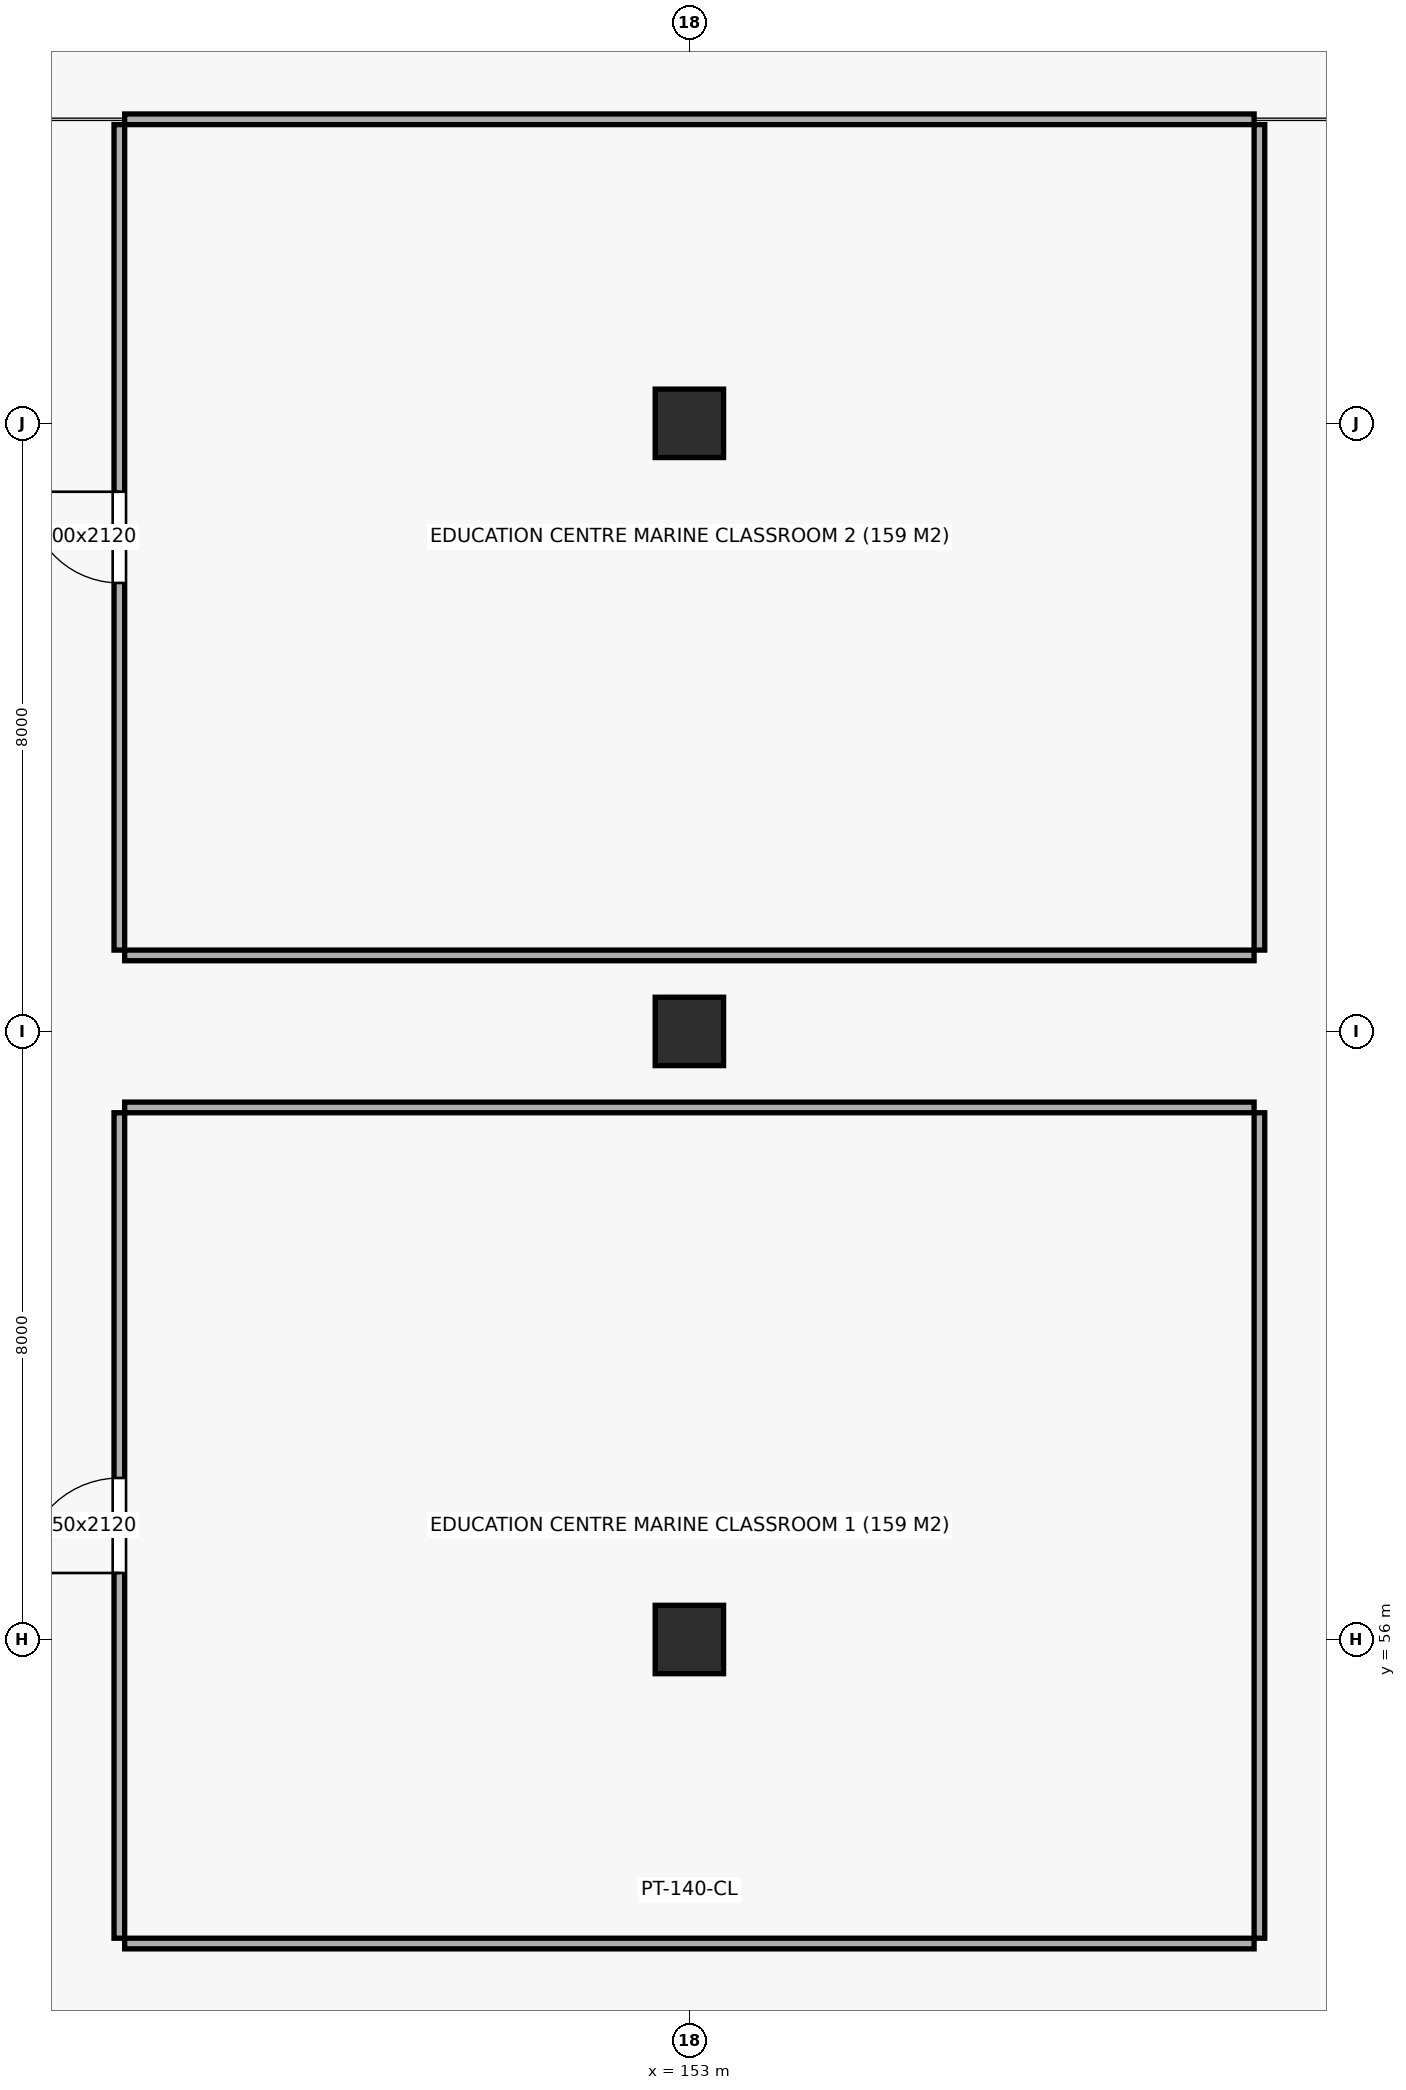
"""IFC4 building model, lengths in metres.
Left out: names, types, materials, properties, quantities, classifications, styles, units other than length and angle.
Written with IfcOpenShell. Run it as: python <this file> out.ifc"""

import sys

from ifc_helpers import new_model, si_unit, direction, frame, frame_2d, origin, origin_2d, place, context, subcontext, project, spatial, rectangle, extrude, element, fill, save


model = new_model("IFC4")
c1 = context("Model", 3, precision=1e-05, world=origin(), true_north=direction((0.0, 1.0)))
c2 = subcontext(c1, "Body", "Model", "MODEL_VIEW")
j1 = project(units=[si_unit("LENGTHUNIT", "METRE"), si_unit("PLANEANGLEUNIT", "RADIAN")], contexts=[c1])
p1 = place(None, origin())
s1 = spatial("IfcSite", under=j1, at=p1, CompositionType="ELEMENT")
p2 = place(p1, origin())
s2 = spatial("IfcBuilding", under=s1, at=p2, CompositionType="ELEMENT")
p3 = place(p2, origin())
s3 = spatial("IfcBuildingStorey", under=s2, at=p3, CompositionType="ELEMENT", Elevation=0.0)
for number, where, z_axis, x_axis in (
    (1, (153.0, 56.0, 0.0), (0.0, 0.0, 1.0), (1.0, 0.0, 0.0)),
    (2, (153.0, 64.0, 0.0), (0.0, 0.0, 1.0), (1.0, 0.0, 0.0)),
    (3, (153.0, 72.0, 0.0), (0.0, 0.0, 1.0), (1.0, 0.0, 0.0)),
):
    element("IfcColumn", number, at=place(p3, frame(where, z_axis=z_axis, x_axis=x_axis)), inside=s3, PredefinedType="COLUMN", context=c2, shape_type="SweptSolid", body=[
        extrude(rectangle(XDim=0.9, YDim=0.9, at=origin_2d()), origin(), (0.0, 0.0, 1.0), 4.5),
    ])
p4 = place(p3, frame((145.57, 52.0, 0.0), z_axis=(0.0, 0.0, 1.0), x_axis=(1.0, 0.0, 0.0)))
e4 = element("IfcWall", 4, at=p4, inside=s3, PredefinedType="PARTITIONING", context=c2, shape_type="SweptSolid", body=[
    extrude(rectangle(XDim=14.86, YDim=0.14, at=frame_2d((7.43, 0.0))), origin(), (0.0, 0.0, 1.0), 2.85),
])
p5 = place(p3, frame((145.57, 63.0, 0.0), z_axis=(0.0, 0.0, 1.0), x_axis=(1.0, 0.0, 0.0)))
e5 = element("IfcWall", 5, at=p5, inside=s3, PredefinedType="PARTITIONING", context=c2, shape_type="SweptSolid", body=[
    extrude(rectangle(XDim=14.86, YDim=0.14, at=frame_2d((7.43, 0.0))), origin(), (0.0, 0.0, 1.0), 3.3),
])
p6 = place(p3, frame((145.5, 52.07, 0.0), z_axis=(0.0, 0.0, 1.0), x_axis=(0.0, 1.0, 0.0)))
e6 = element("IfcWall", 6, at=p6, inside=s3, PredefinedType="PARTITIONING", context=c2, shape_type="SweptSolid", body=[
    extrude(rectangle(XDim=10.86, YDim=0.14, at=frame_2d((5.43, 0.0))), origin(), (0.0, 0.0, 1.0), 3.3),
])
p7 = place(p6, frame((4.805, 0.0, 0.0)))
e7 = element("IfcOpeningElement", 7, at=p7, cuts=e6, PredefinedType="OPENING", context=c2, shape_type="SweptSolid", body=[
    extrude(rectangle(XDim=1.25, YDim=2.12, at=frame_2d((0.625, 1.06))), frame((0.0, 0.082, 0.0), z_axis=(0.0, -1.0, 0.0), x_axis=(1.0, 0.0, 0.0)), (0.0, 0.0, 1.0), 0.164),
])
p8 = place(p3, frame((160.5, 52.07, 0.0), z_axis=(0.0, 0.0, 1.0), x_axis=(0.0, 1.0, 0.0)))
e8 = element("IfcWall", 8, at=p8, inside=s3, PredefinedType="PARTITIONING", context=c2, shape_type="SweptSolid", body=[
    extrude(rectangle(XDim=10.86, YDim=0.14, at=frame_2d((5.43, 0.0))), origin(), (0.0, 0.0, 1.0), 3.3),
])
p9 = place(p3, frame((145.57, 65.0, 0.0), z_axis=(0.0, 0.0, 1.0), x_axis=(1.0, 0.0, 0.0)))
e9 = element("IfcWall", 9, at=p9, inside=s3, PredefinedType="PARTITIONING", context=c2, shape_type="SweptSolid", body=[
    extrude(rectangle(XDim=14.86, YDim=0.14, at=frame_2d((7.43, 0.0))), origin(), (0.0, 0.0, 1.0), 3.3),
])
p10 = place(p3, frame((145.57, 76.0, 0.0), z_axis=(0.0, 0.0, 1.0), x_axis=(1.0, 0.0, 0.0)))
e10 = element("IfcWall", 10, at=p10, inside=s3, PredefinedType="PARTITIONING", context=c2, shape_type="SweptSolid", body=[
    extrude(rectangle(XDim=14.86, YDim=0.14, at=frame_2d((7.43, 0.0))), origin(), (0.0, 0.0, 1.0), 2.85),
])
p11 = place(p3, frame((145.5, 65.07, 0.0), z_axis=(0.0, 0.0, 1.0), x_axis=(0.0, 1.0, 0.0)))
e11 = element("IfcWall", 11, at=p11, inside=s3, PredefinedType="PARTITIONING", context=c2, shape_type="SweptSolid", body=[
    extrude(rectangle(XDim=10.86, YDim=0.14, at=frame_2d((5.43, 0.0))), origin(), (0.0, 0.0, 1.0), 3.3),
])
p12 = place(p11, frame((4.83, 0.0, 0.0)))
e12 = element("IfcOpeningElement", 12, at=p12, cuts=e11, PredefinedType="OPENING", context=c2, shape_type="SweptSolid", body=[
    extrude(rectangle(XDim=1.2, YDim=2.12, at=frame_2d((0.6, 1.06))), frame((0.0, 0.082, 0.0), z_axis=(0.0, -1.0, 0.0), x_axis=(1.0, 0.0, 0.0)), (0.0, 0.0, 1.0), 0.164),
])
p13 = place(p3, frame((160.5, 65.07, 0.0), z_axis=(0.0, 0.0, 1.0), x_axis=(0.0, 1.0, 0.0)))
e13 = element("IfcWall", 13, at=p13, inside=s3, PredefinedType="PARTITIONING", context=c2, shape_type="SweptSolid", body=[
    extrude(rectangle(XDim=10.86, YDim=0.14, at=frame_2d((5.43, 0.0))), origin(), (0.0, 0.0, 1.0), 3.3),
])
p14 = place(p7, origin())
e14 = element("IfcDoor", 14, at=p14, inside=s3, OperationType="SINGLE_SWING_LEFT", PredefinedType="DOOR", context=c2, shape_type="SweptSolid", body=[
    extrude(rectangle(XDim=1.25, YDim=2.12, at=frame_2d((0.625, 1.06))), frame((0.0, 0.025, 0.0), z_axis=(0.0, -1.0, 0.0), x_axis=(1.0, 0.0, 0.0)), (0.0, 0.0, 1.0), 0.05),
])
fill(e7, e14)
p15 = place(p12, origin())
e15 = element("IfcDoor", 15, at=p15, inside=s3, OperationType="SINGLE_SWING_RIGHT", PredefinedType="DOOR", context=c2, shape_type="SweptSolid", body=[
    extrude(rectangle(XDim=1.2, YDim=2.12, at=frame_2d((0.6, 1.06))), frame((0.0, 0.025, 0.0), z_axis=(0.0, -1.0, 0.0), x_axis=(1.0, 0.0, 0.0)), (0.0, 0.0, 1.0), 0.05),
])
fill(e12, e15)
save(model, sys.argv[1])
